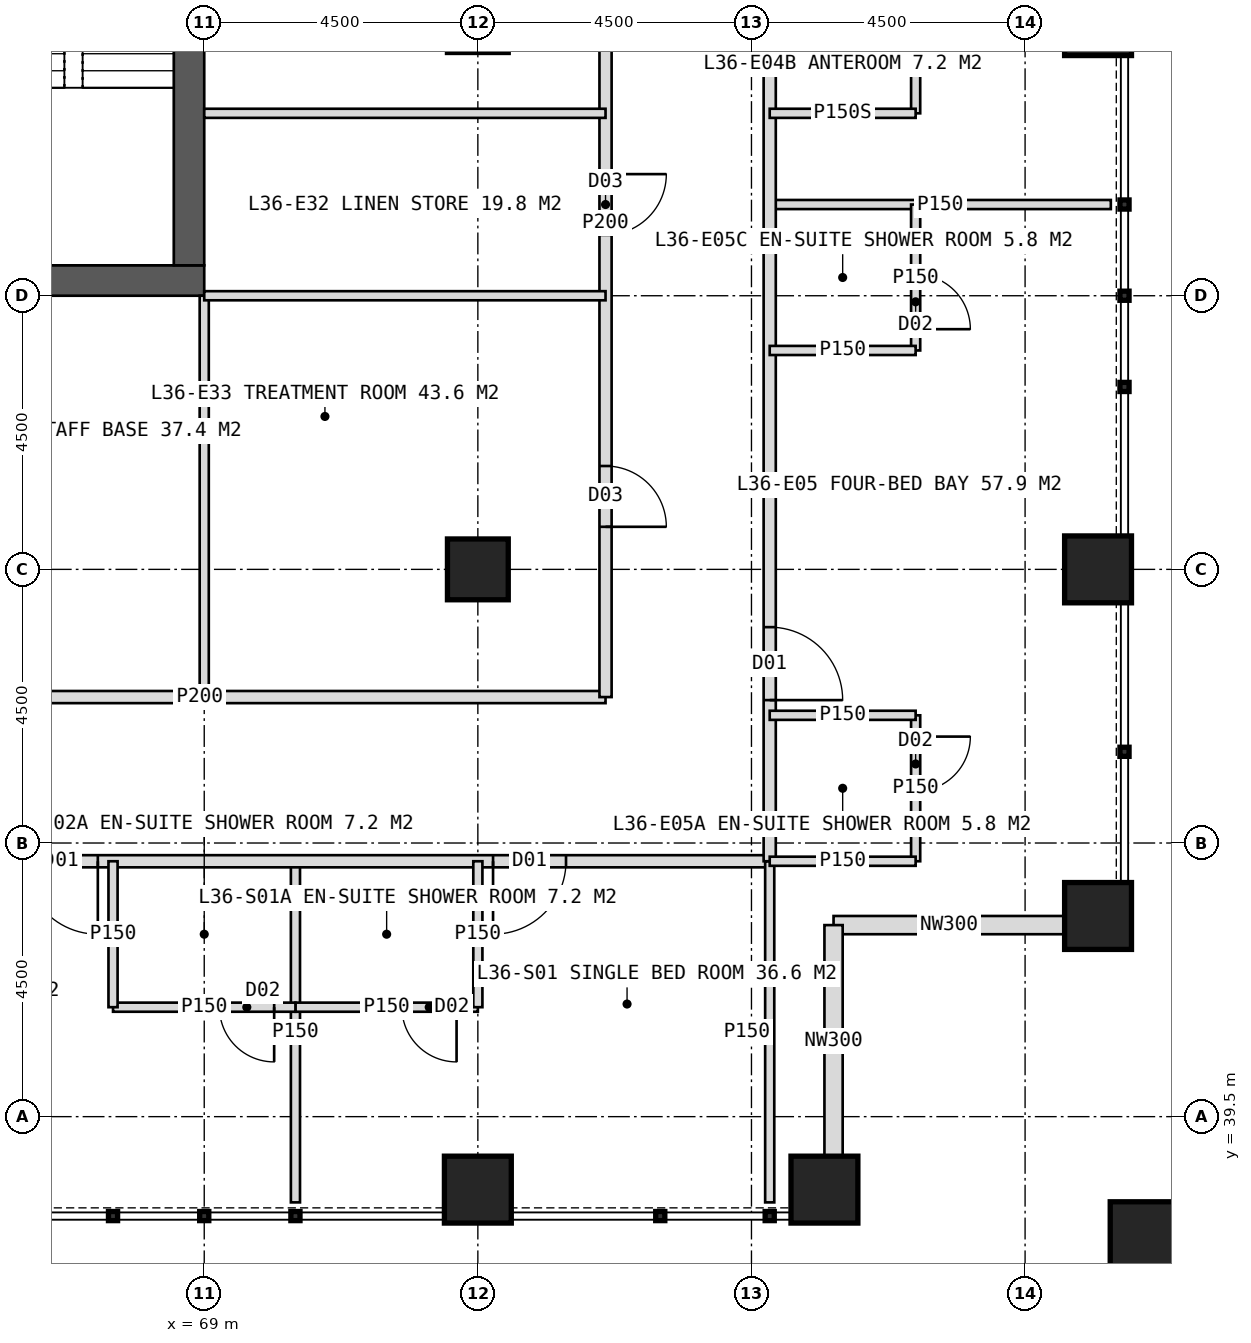
"""IFC4 building model, lengths in metres.
Left out: names, types, materials, properties, quantities, classifications, styles, units other than length and angle.
Written with IfcOpenShell. Run it as: python <this file> out.ifc"""

import sys

from ifc_helpers import new_model, si_unit, direction, frame, frame_2d, origin, origin_2d, place, context, subcontext, project, spatial, rectangle, hollow_rectangle, extrude, element, fill, save


model = new_model("IFC4")
c1 = context("Model", 3, precision=1e-05, world=origin(), true_north=direction((0.0, 1.0)))
c2 = subcontext(c1, "Body", "Model", "MODEL_VIEW")
j1 = project(units=[si_unit("LENGTHUNIT", "METRE"), si_unit("PLANEANGLEUNIT", "RADIAN")], contexts=[c1])
p1 = place(None, origin())
s1 = spatial("IfcSite", under=j1, at=p1, CompositionType="ELEMENT")
p2 = place(p1, origin())
s2 = spatial("IfcBuilding", under=s1, at=p2, CompositionType="ELEMENT")
p3 = place(p2, frame((0.0, 0.0, 152.0)))
s3 = spatial("IfcBuildingStorey", under=s2, at=p3, CompositionType="ELEMENT", Elevation=152.0)
p4 = place(p3, frame((51.0, 53.25, 0.0), z_axis=(0.0, 0.0, 1.0), x_axis=(1.0, 0.0, 0.0)))
e1 = element("IfcWall", 1, at=p4, inside=s3, PredefinedType="SHEAR", context=c2, shape_type="SweptSolid", body=[
    extrude(rectangle(XDim=18.0, YDim=0.5, at=frame_2d((9.0, 0.0))), origin(), (0.0, 0.0, 1.0), 4.0),
])
p5 = place(p4, frame((8.1, 0.0, 0.0)))
e2 = element("IfcOpeningElement", 2, at=p5, cuts=e1, PredefinedType="OPENING", context=c2, shape_type="SweptSolid", body=[
    extrude(rectangle(XDim=1.8, YDim=2.2, at=frame_2d((0.9, 1.1))), frame((0.0, 0.26, 0.0), z_axis=(0.0, -1.0, 0.0), x_axis=(1.0, 0.0, 0.0)), (0.0, 0.0, 1.0), 0.52),
])
p6 = place(p3, frame((68.75, 53.5, 0.0), z_axis=(0.0, 0.0, 1.0), x_axis=(0.0, 1.0, 0.0)))
e3 = element("IfcWall", 3, at=p6, inside=s3, PredefinedType="SHEAR", context=c2, shape_type="SweptSolid", body=[
    extrude(rectangle(XDim=17.0, YDim=0.5, at=frame_2d((8.5, 0.0))), origin(), (0.0, 0.0, 1.0), 4.0),
])
p7 = place(p6, frame((9.5, 0.0, 0.0)))
e4 = element("IfcOpeningElement", 4, at=p7, cuts=e3, PredefinedType="OPENING", context=c2, shape_type="SweptSolid", body=[
    extrude(rectangle(XDim=1.5, YDim=2.2, at=frame_2d((0.75, 1.1))), frame((0.0, 0.26, 0.0), z_axis=(0.0, -1.0, 0.0), x_axis=(1.0, 0.0, 0.0)), (0.0, 0.0, 1.0), 0.52),
])
p8 = place(p3, frame((73.5, 48.5, 0.0), z_axis=(0.0, 0.0, 1.0), x_axis=(1.0, 0.0, 0.0)))
e5 = element("IfcColumn", 5, at=p8, inside=s3, PredefinedType="COLUMN", context=c2, shape_type="SweptSolid", body=[
    extrude(hollow_rectangle(XDim=1.0, YDim=1.0, WallThickness=0.1, at=origin_2d()), origin(), (0.0, 0.0, 1.0), 4.0),
])
for number, where, z_axis, x_axis in (
    (6, (83.7, 42.8, 0.0), (0.0, 0.0, 1.0), (1.0, 0.0, 0.0)),
    (7, (83.7, 48.5, 0.0), (0.0, 0.0, 1.0), (1.0, 0.0, 0.0)),
    (8, (83.7, 57.5, 0.0), (0.0, 0.0, 1.0), (1.0, 0.0, 0.0)),
    (9, (73.5, 38.3, 0.0), (0.0, 0.0, 1.0), (1.0, 0.0, 0.0)),
    (10, (79.2, 38.3, 0.0), (0.0, 0.0, 1.0), (1.0, 0.0, 0.0)),
):
    element("IfcColumn", number, at=place(p3, frame(where, z_axis=z_axis, x_axis=x_axis)), inside=s3, PredefinedType="COLUMN", context=c2, shape_type="SweptSolid", body=[
        extrude(hollow_rectangle(XDim=1.1, YDim=1.1, WallThickness=0.1, at=origin_2d()), origin(), (0.0, 0.0, 1.0), 4.0),
    ])
p9 = place(p3, frame((84.6, 37.4, 0.0), z_axis=(0.0, 0.0, 1.0), x_axis=(1.0, 0.0, 0.0)))
e11 = element("IfcColumn", 11, at=p9, inside=s3, PredefinedType="COLUMN", context=c2, shape_type="SweptSolid", body=[
    extrude(hollow_rectangle(XDim=1.4, YDim=1.4, WallThickness=0.08, at=origin_2d()), origin(), (0.0, 0.0, 1.0), 4.0),
])
for number, where, z_axis, x_axis in (
    (12, (83.15, 42.65, 0.0), (0.0, 0.0, 1.0), (-1.0, 0.0, 0.0)),
    (13, (79.35, 42.65, 0.0), (0.0, 0.0, 1.0), (0.0, -1.0, 0.0)),
):
    element("IfcWall", number, at=place(p3, frame(where, z_axis=z_axis, x_axis=x_axis)), inside=s3, PredefinedType="ELEMENTEDWALL", context=c2, shape_type="SweptSolid", body=[
        extrude(rectangle(XDim=3.8, YDim=0.3, at=frame_2d((1.9, 0.0))), origin(), (0.0, 0.0, 1.0), 4.0),
    ])
p10 = place(p3, frame((70.5, 43.7, 0.0), z_axis=(0.0, 0.0, 1.0), x_axis=(0.0, -1.0, 0.0)))
e14 = element("IfcWall", 14, at=p10, inside=s3, PredefinedType="PARTITIONING", context=c2, shape_type="SweptSolid", body=[
    extrude(rectangle(XDim=5.61, YDim=0.15, at=frame_2d((2.805, 0.0))), origin(), (0.0, 0.0, 1.0), 3.75),
])
p11 = place(p3, frame((78.3, 43.7, 0.0), z_axis=(0.0, 0.0, 1.0), x_axis=(-1.0, 0.0, 0.0)))
e15 = element("IfcWall", 15, at=p11, inside=s3, PredefinedType="PARTITIONING", context=c2, shape_type="SweptSolid", body=[
    extrude(rectangle(XDim=36.6, YDim=0.2, at=frame_2d((18.3, 0.0))), origin(), (0.0, 0.0, 1.0), 3.75),
])
p12 = place(p11, frame((3.35, 0.0, 0.0)))
e16 = element("IfcOpeningElement", 16, at=p12, cuts=e15, PredefinedType="OPENING", context=c2, shape_type="SweptSolid", body=[
    extrude(rectangle(XDim=1.2, YDim=2.2, at=frame_2d((0.6, 1.1))), frame((0.0, 0.11, 0.0), z_axis=(0.0, -1.0, 0.0), x_axis=(1.0, 0.0, 0.0)), (0.0, 0.0, 1.0), 0.22),
])
p13 = place(p11, frame((11.05, 0.0, 0.0)))
e17 = element("IfcOpeningElement", 17, at=p13, cuts=e15, PredefinedType="OPENING", context=c2, shape_type="SweptSolid", body=[
    extrude(rectangle(XDim=1.2, YDim=2.2, at=frame_2d((0.6, 1.1))), frame((0.0, 0.11, 0.0), z_axis=(0.0, -1.0, 0.0), x_axis=(1.0, 0.0, 0.0)), (0.0, 0.0, 1.0), 0.22),
])
p14 = place(p11, frame((19.85, 0.0, 0.0)))
e18 = element("IfcOpeningElement", 18, at=p14, cuts=e15, PredefinedType="OPENING", context=c2, shape_type="SweptSolid", body=[
    extrude(rectangle(XDim=1.2, YDim=2.2, at=frame_2d((0.6, 1.1))), frame((0.0, 0.11, 0.0), z_axis=(0.0, -1.0, 0.0), x_axis=(1.0, 0.0, 0.0)), (0.0, 0.0, 1.0), 0.22),
])
p15 = place(p11, frame((26.95, 0.0, 0.0)))
e19 = element("IfcOpeningElement", 19, at=p15, cuts=e15, PredefinedType="OPENING", context=c2, shape_type="SweptSolid", body=[
    extrude(rectangle(XDim=1.2, YDim=2.2, at=frame_2d((0.6, 1.1))), frame((0.0, 0.11, 0.0), z_axis=(0.0, -1.0, 0.0), x_axis=(1.0, 0.0, 0.0)), (0.0, 0.0, 1.0), 0.22),
])
p16 = place(p3, frame((78.3, 43.7, 0.0), z_axis=(0.0, 0.0, 1.0), x_axis=(0.0, -1.0, 0.0)))
e20 = element("IfcWall", 20, at=p16, inside=s3, PredefinedType="PARTITIONING", context=c2, shape_type="SweptSolid", body=[
    extrude(rectangle(XDim=5.61, YDim=0.15, at=frame_2d((2.805, 0.0))), origin(), (0.0, 0.0, 1.0), 3.75),
])
p17 = place(p3, frame((73.5, 41.3, 0.0), z_axis=(0.0, 0.0, 1.0), x_axis=(-1.0, 0.0, 0.0)))
e21 = element("IfcWall", 21, at=p17, inside=s3, PredefinedType="PARTITIONING", context=c2, shape_type="SweptSolid", body=[
    extrude(rectangle(XDim=3.0, YDim=0.15, at=frame_2d((1.5, 0.0))), origin(), (0.0, 0.0, 1.0), 3.75),
])
p18 = place(p17, frame((0.35, 0.0, 0.0)))
e22 = element("IfcOpeningElement", 22, at=p18, cuts=e21, PredefinedType="OPENING", context=c2, shape_type="SweptSolid", body=[
    extrude(rectangle(XDim=0.9, YDim=2.1, at=frame_2d((0.45, 1.05))), frame((0.0, 0.085, 0.0), z_axis=(0.0, -1.0, 0.0), x_axis=(1.0, 0.0, 0.0)), (0.0, 0.0, 1.0), 0.17),
])
p19 = place(p3, frame((73.5, 43.7, 0.0), z_axis=(0.0, 0.0, 1.0), x_axis=(0.0, -1.0, 0.0)))
e23 = element("IfcWall", 23, at=p19, inside=s3, PredefinedType="PARTITIONING", context=c2, shape_type="SweptSolid", body=[
    extrude(rectangle(XDim=2.4, YDim=0.15, at=frame_2d((1.2, 0.0))), origin(), (0.0, 0.0, 1.0), 2.95),
])
p20 = place(p3, frame((70.5, 41.3, 0.0), z_axis=(0.0, 0.0, 1.0), x_axis=(-1.0, 0.0, 0.0)))
e24 = element("IfcWall", 24, at=p20, inside=s3, PredefinedType="PARTITIONING", context=c2, shape_type="SweptSolid", body=[
    extrude(rectangle(XDim=3.0, YDim=0.15, at=frame_2d((1.5, 0.0))), origin(), (0.0, 0.0, 1.0), 3.75),
])
p21 = place(p20, frame((0.35, 0.0, 0.0)))
e25 = element("IfcOpeningElement", 25, at=p21, cuts=e24, PredefinedType="OPENING", context=c2, shape_type="SweptSolid", body=[
    extrude(rectangle(XDim=0.9, YDim=2.1, at=frame_2d((0.45, 1.05))), frame((0.0, 0.085, 0.0), z_axis=(0.0, -1.0, 0.0), x_axis=(1.0, 0.0, 0.0)), (0.0, 0.0, 1.0), 0.17),
])
p22 = place(p3, frame((67.5, 43.7, 0.0), z_axis=(0.0, 0.0, 1.0), x_axis=(0.0, -1.0, 0.0)))
e26 = element("IfcWall", 26, at=p22, inside=s3, PredefinedType="PARTITIONING", context=c2, shape_type="SweptSolid", body=[
    extrude(rectangle(XDim=2.4, YDim=0.15, at=frame_2d((1.2, 0.0))), origin(), (0.0, 0.0, 1.0), 3.75),
])
p23 = place(p3, frame((69.0, 53.0, 0.0), z_axis=(0.0, 0.0, 1.0), x_axis=(0.0, -1.0, 0.0)))
e27 = element("IfcWall", 27, at=p23, inside=s3, PredefinedType="PARTITIONING", context=c2, shape_type="SweptSolid", body=[
    extrude(rectangle(XDim=6.6, YDim=0.15, at=frame_2d((3.3, 0.0))), origin(), (0.0, 0.0, 1.0), 3.75),
])
p24 = place(p3, frame((75.6, 46.4, 0.0), z_axis=(0.0, 0.0, 1.0), x_axis=(-1.0, 0.0, 0.0)))
e28 = element("IfcWall", 28, at=p24, inside=s3, PredefinedType="PARTITIONING", context=c2, shape_type="SweptSolid", body=[
    extrude(rectangle(XDim=13.35, YDim=0.2, at=frame_2d((6.675, 0.0))), origin(), (0.0, 0.0, 1.0), 3.75),
])
p25 = place(p24, frame((9.475, 0.0, 0.0)))
e29 = element("IfcOpeningElement", 29, at=p25, cuts=e28, PredefinedType="OPENING", context=c2, shape_type="SweptSolid", body=[
    extrude(rectangle(XDim=1.0, YDim=2.1, at=frame_2d((0.5, 1.05))), frame((0.0, 0.11, 0.0), z_axis=(0.0, -1.0, 0.0), x_axis=(1.0, 0.0, 0.0)), (0.0, 0.0, 1.0), 0.22),
])
p26 = place(p3, frame((78.3, 54.5, 0.0), z_axis=(0.0, 0.0, 1.0), x_axis=(1.0, 0.0, 0.0)))
e30 = element("IfcWall", 30, at=p26, inside=s3, PredefinedType="PARTITIONING", context=c2, shape_type="SweptSolid", body=[
    extrude(rectangle(XDim=5.61, YDim=0.15, at=frame_2d((2.805, 0.0))), origin(), (0.0, 0.0, 1.0), 3.75),
])
p27 = place(p3, frame((78.3, 80.3, 0.0), z_axis=(0.0, 0.0, 1.0), x_axis=(0.0, -1.0, 0.0)))
e31 = element("IfcWall", 31, at=p27, inside=s3, PredefinedType="PARTITIONING", context=c2, shape_type="SweptSolid", body=[
    extrude(rectangle(XDim=36.6, YDim=0.2, at=frame_2d((18.3, 0.0))), origin(), (0.0, 0.0, 1.0), 3.75),
])
p28 = place(p27, frame((3.35, 0.0, 0.0)))
e32 = element("IfcOpeningElement", 32, at=p28, cuts=e31, PredefinedType="OPENING", context=c2, shape_type="SweptSolid", body=[
    extrude(rectangle(XDim=1.2, YDim=2.2, at=frame_2d((0.6, 1.1))), frame((0.0, 0.11, 0.0), z_axis=(0.0, -1.0, 0.0), x_axis=(1.0, 0.0, 0.0)), (0.0, 0.0, 1.0), 0.22),
])
p29 = place(p27, frame((11.05, 0.0, 0.0)))
e33 = element("IfcOpeningElement", 33, at=p29, cuts=e31, PredefinedType="OPENING", context=c2, shape_type="SweptSolid", body=[
    extrude(rectangle(XDim=1.2, YDim=2.2, at=frame_2d((0.6, 1.1))), frame((0.0, 0.11, 0.0), z_axis=(0.0, -1.0, 0.0), x_axis=(1.0, 0.0, 0.0)), (0.0, 0.0, 1.0), 0.22),
])
p30 = place(p27, frame((16.3, 0.0, 0.0)))
e34 = element("IfcOpeningElement", 34, at=p30, cuts=e31, PredefinedType="OPENING", context=c2, shape_type="SweptSolid", body=[
    extrude(rectangle(XDim=1.0, YDim=2.1, at=frame_2d((0.5, 1.05))), frame((0.0, 0.11, 0.0), z_axis=(0.0, -1.0, 0.0), x_axis=(1.0, 0.0, 0.0)), (0.0, 0.0, 1.0), 0.22),
])
p31 = place(p27, frame((21.55, 0.0, 0.0)))
e35 = element("IfcOpeningElement", 35, at=p31, cuts=e31, PredefinedType="OPENING", context=c2, shape_type="SweptSolid", body=[
    extrude(rectangle(XDim=1.2, YDim=2.2, at=frame_2d((0.6, 1.1))), frame((0.0, 0.11, 0.0), z_axis=(0.0, -1.0, 0.0), x_axis=(1.0, 0.0, 0.0)), (0.0, 0.0, 1.0), 0.22),
])
p32 = place(p27, frame((32.75, 0.0, 0.0)))
e36 = element("IfcOpeningElement", 36, at=p32, cuts=e31, PredefinedType="OPENING", context=c2, shape_type="SweptSolid", body=[
    extrude(rectangle(XDim=1.2, YDim=2.2, at=frame_2d((0.6, 1.1))), frame((0.0, 0.11, 0.0), z_axis=(0.0, -1.0, 0.0), x_axis=(1.0, 0.0, 0.0)), (0.0, 0.0, 1.0), 0.22),
])
p33 = place(p3, frame((80.7, 59.0, 0.0), z_axis=(0.0, 0.0, 1.0), x_axis=(0.0, -1.0, 0.0)))
e37 = element("IfcWall", 37, at=p33, inside=s3, PredefinedType="PARTITIONING", context=c2, shape_type="SweptSolid", body=[
    extrude(rectangle(XDim=3.0, YDim=0.15, at=frame_2d((1.5, 0.0))), origin(), (0.0, 0.0, 1.0), 3.75),
])
p34 = place(p33, frame((0.25, 0.0, 0.0)))
e38 = element("IfcOpeningElement", 38, at=p34, cuts=e37, PredefinedType="OPENING", context=c2, shape_type="SweptSolid", body=[
    extrude(rectangle(XDim=1.2, YDim=2.2, at=frame_2d((0.6, 1.1))), frame((0.0, 0.085, 0.0), z_axis=(0.0, -1.0, 0.0), x_axis=(1.0, 0.0, 0.0)), (0.0, 0.0, 1.0), 0.17),
])
p35 = place(p3, frame((78.3, 56.0, 0.0), z_axis=(0.0, 0.0, 1.0), x_axis=(1.0, 0.0, 0.0)))
e39 = element("IfcWall", 39, at=p35, inside=s3, PredefinedType="PARTITIONING", context=c2, shape_type="SweptSolid", body=[
    extrude(rectangle(XDim=2.4, YDim=0.15, at=frame_2d((1.2, 0.0))), origin(), (0.0, 0.0, 1.0), 3.75),
])
p36 = place(p3, frame((80.7, 46.1, 0.0), z_axis=(0.0, 0.0, 1.0), x_axis=(0.0, -1.0, 0.0)))
e40 = element("IfcWall", 40, at=p36, inside=s3, PredefinedType="PARTITIONING", context=c2, shape_type="SweptSolid", body=[
    extrude(rectangle(XDim=2.4, YDim=0.15, at=frame_2d((1.2, 0.0))), origin(), (0.0, 0.0, 1.0), 3.75),
])
p37 = place(p36, frame((0.35, 0.0, 0.0)))
e41 = element("IfcOpeningElement", 41, at=p37, cuts=e40, PredefinedType="OPENING", context=c2, shape_type="SweptSolid", body=[
    extrude(rectangle(XDim=0.9, YDim=2.1, at=frame_2d((0.45, 1.05))), frame((0.0, 0.085, 0.0), z_axis=(0.0, -1.0, 0.0), x_axis=(1.0, 0.0, 0.0)), (0.0, 0.0, 1.0), 0.17),
])
p38 = place(p3, frame((78.3, 46.1, 0.0), z_axis=(0.0, 0.0, 1.0), x_axis=(1.0, 0.0, 0.0)))
e42 = element("IfcWall", 42, at=p38, inside=s3, PredefinedType="PARTITIONING", context=c2, shape_type="SweptSolid", body=[
    extrude(rectangle(XDim=2.4, YDim=0.15, at=frame_2d((1.2, 0.0))), origin(), (0.0, 0.0, 1.0), 3.75),
])
p39 = place(p3, frame((80.7, 54.5, 0.0), z_axis=(0.0, 0.0, 1.0), x_axis=(0.0, -1.0, 0.0)))
e43 = element("IfcWall", 43, at=p39, inside=s3, PredefinedType="PARTITIONING", context=c2, shape_type="SweptSolid", body=[
    extrude(rectangle(XDim=2.4, YDim=0.15, at=frame_2d((1.2, 0.0))), origin(), (0.0, 0.0, 1.0), 3.75),
])
p40 = place(p39, frame((1.15, 0.0, 0.0)))
e44 = element("IfcOpeningElement", 44, at=p40, cuts=e43, PredefinedType="OPENING", context=c2, shape_type="SweptSolid", body=[
    extrude(rectangle(XDim=0.9, YDim=2.1, at=frame_2d((0.45, 1.05))), frame((0.0, 0.085, 0.0), z_axis=(0.0, -1.0, 0.0), x_axis=(1.0, 0.0, 0.0)), (0.0, 0.0, 1.0), 0.17),
])
for number, where, z_axis, x_axis in (
    (45, (78.3, 52.1, 0.0), (0.0, 0.0, 1.0), (1.0, 0.0, 0.0)),
    (46, (78.3, 43.7, 0.0), (0.0, 0.0, 1.0), (1.0, 0.0, 0.0)),
):
    element("IfcWall", number, at=place(p3, frame(where, z_axis=z_axis, x_axis=x_axis)), inside=s3, PredefinedType="PARTITIONING", context=c2, shape_type="SweptSolid", body=[
        extrude(rectangle(XDim=2.4, YDim=0.15, at=frame_2d((1.2, 0.0))), origin(), (0.0, 0.0, 1.0), 3.75),
    ])
p41 = place(p3, frame((75.6, 62.0, 0.0), z_axis=(0.0, 0.0, 1.0), x_axis=(0.0, -1.0, 0.0)))
e47 = element("IfcWall", 47, at=p41, inside=s3, PredefinedType="PARTITIONING", context=c2, shape_type="SweptSolid", body=[
    extrude(rectangle(XDim=15.6, YDim=0.2, at=frame_2d((7.8, 0.0))), origin(), (0.0, 0.0, 1.0), 3.75),
])
p42 = place(p41, frame((2.5, 0.0, 0.0)))
e48 = element("IfcOpeningElement", 48, at=p42, cuts=e47, PredefinedType="OPENING", context=c2, shape_type="SweptSolid", body=[
    extrude(rectangle(XDim=1.0, YDim=2.1, at=frame_2d((0.5, 1.05))), frame((0.0, 0.11, 0.0), z_axis=(0.0, -1.0, 0.0), x_axis=(1.0, 0.0, 0.0)), (0.0, 0.0, 1.0), 0.22),
])
p43 = place(p41, frame((7.0, 0.0, 0.0)))
e49 = element("IfcOpeningElement", 49, at=p43, cuts=e47, PredefinedType="OPENING", context=c2, shape_type="SweptSolid", body=[
    extrude(rectangle(XDim=1.0, YDim=2.1, at=frame_2d((0.5, 1.05))), frame((0.0, 0.11, 0.0), z_axis=(0.0, -1.0, 0.0), x_axis=(1.0, 0.0, 0.0)), (0.0, 0.0, 1.0), 0.22),
])
p44 = place(p41, frame((11.8, 0.0, 0.0)))
e50 = element("IfcOpeningElement", 50, at=p44, cuts=e47, PredefinedType="OPENING", context=c2, shape_type="SweptSolid", body=[
    extrude(rectangle(XDim=1.0, YDim=2.1, at=frame_2d((0.5, 1.05))), frame((0.0, 0.11, 0.0), z_axis=(0.0, -1.0, 0.0), x_axis=(1.0, 0.0, 0.0)), (0.0, 0.0, 1.0), 0.22),
])
for number, where, z_axis, x_axis in (
    (51, (69.0, 56.0, 0.0), (0.0, 0.0, 1.0), (1.0, 0.0, 0.0)),
    (52, (69.0, 53.0, 0.0), (0.0, 0.0, 1.0), (1.0, 0.0, 0.0)),
):
    element("IfcWall", number, at=place(p3, frame(where, z_axis=z_axis, x_axis=x_axis)), inside=s3, PredefinedType="PARTITIONING", context=c2, shape_type="SweptSolid", body=[
        extrude(rectangle(XDim=6.6, YDim=0.15, at=frame_2d((3.3, 0.0))), origin(), (0.0, 0.0, 1.0), 3.75),
    ])
p45 = place(p12, origin())
e53 = element("IfcDoor", 53, at=p45, inside=s3, OperationType="SINGLE_SWING_RIGHT", PredefinedType="DOOR", context=c2, shape_type="SweptSolid", body=[
    extrude(rectangle(XDim=1.2, YDim=2.2, at=frame_2d((0.6, 1.1))), frame((0.0, 0.025, 0.0), z_axis=(0.0, -1.0, 0.0), x_axis=(1.0, 0.0, 0.0)), (0.0, 0.0, 1.0), 0.05),
])
fill(e16, e53)
p46 = place(p18, origin())
e54 = element("IfcDoor", 54, at=p46, inside=s3, OperationType="SINGLE_SWING_LEFT", PredefinedType="DOOR", context=c2, shape_type="SweptSolid", body=[
    extrude(rectangle(XDim=0.9, YDim=2.1, at=frame_2d((0.45, 1.05))), frame((0.0, 0.025, 0.0), z_axis=(0.0, -1.0, 0.0), x_axis=(1.0, 0.0, 0.0)), (0.0, 0.0, 1.0), 0.05),
])
fill(e22, e54)
p47 = place(p13, origin())
e55 = element("IfcDoor", 55, at=p47, inside=s3, OperationType="SINGLE_SWING_LEFT", PredefinedType="DOOR", context=c2, shape_type="SweptSolid", body=[
    extrude(rectangle(XDim=1.2, YDim=2.2, at=frame_2d((0.6, 1.1))), frame((0.0, 0.025, 0.0), z_axis=(0.0, -1.0, 0.0), x_axis=(1.0, 0.0, 0.0)), (0.0, 0.0, 1.0), 0.05),
])
fill(e17, e55)
p48 = place(p21, origin())
e56 = element("IfcDoor", 56, at=p48, inside=s3, OperationType="SINGLE_SWING_LEFT", PredefinedType="DOOR", context=c2, shape_type="SweptSolid", body=[
    extrude(rectangle(XDim=0.9, YDim=2.1, at=frame_2d((0.45, 1.05))), frame((0.0, 0.025, 0.0), z_axis=(0.0, -1.0, 0.0), x_axis=(1.0, 0.0, 0.0)), (0.0, 0.0, 1.0), 0.05),
])
fill(e25, e56)
p49 = place(p32, origin())
e57 = element("IfcDoor", 57, at=p49, inside=s3, OperationType="SINGLE_SWING_RIGHT", PredefinedType="DOOR", context=c2, shape_type="SweptSolid", body=[
    extrude(rectangle(XDim=1.2, YDim=2.2, at=frame_2d((0.6, 1.1))), frame((0.0, 0.025, 0.0), z_axis=(0.0, -1.0, 0.0), x_axis=(1.0, 0.0, 0.0)), (0.0, 0.0, 1.0), 0.05),
])
fill(e36, e57)
p50 = place(p37, origin())
e58 = element("IfcDoor", 58, at=p50, inside=s3, OperationType="SINGLE_SWING_LEFT", PredefinedType="DOOR", context=c2, shape_type="SweptSolid", body=[
    extrude(rectangle(XDim=0.9, YDim=2.1, at=frame_2d((0.45, 1.05))), frame((0.0, 0.025, 0.0), z_axis=(0.0, -1.0, 0.0), x_axis=(1.0, 0.0, 0.0)), (0.0, 0.0, 1.0), 0.05),
])
fill(e41, e58)
p51 = place(p40, origin())
e59 = element("IfcDoor", 59, at=p51, inside=s3, OperationType="SINGLE_SWING_RIGHT", PredefinedType="DOOR", context=c2, shape_type="SweptSolid", body=[
    extrude(rectangle(XDim=0.9, YDim=2.1, at=frame_2d((0.45, 1.05))), frame((0.0, 0.025, 0.0), z_axis=(0.0, -1.0, 0.0), x_axis=(1.0, 0.0, 0.0)), (0.0, 0.0, 1.0), 0.05),
])
fill(e44, e59)
p52 = place(p43, origin())
e60 = element("IfcDoor", 60, at=p52, inside=s3, OperationType="SINGLE_SWING_LEFT", PredefinedType="DOOR", context=c2, shape_type="SweptSolid", body=[
    extrude(rectangle(XDim=1.0, YDim=2.1, at=frame_2d((0.5, 1.05))), frame((0.0, 0.025, 0.0), z_axis=(0.0, -1.0, 0.0), x_axis=(1.0, 0.0, 0.0)), (0.0, 0.0, 1.0), 0.05),
])
fill(e49, e60)
p53 = place(p44, origin())
e61 = element("IfcDoor", 61, at=p53, inside=s3, OperationType="SINGLE_SWING_RIGHT", PredefinedType="DOOR", context=c2, shape_type="SweptSolid", body=[
    extrude(rectangle(XDim=1.0, YDim=2.1, at=frame_2d((0.5, 1.05))), frame((0.0, 0.025, 0.0), z_axis=(0.0, -1.0, 0.0), x_axis=(1.0, 0.0, 0.0)), (0.0, 0.0, 1.0), 0.05),
])
fill(e50, e61)
save(model, sys.argv[1])
